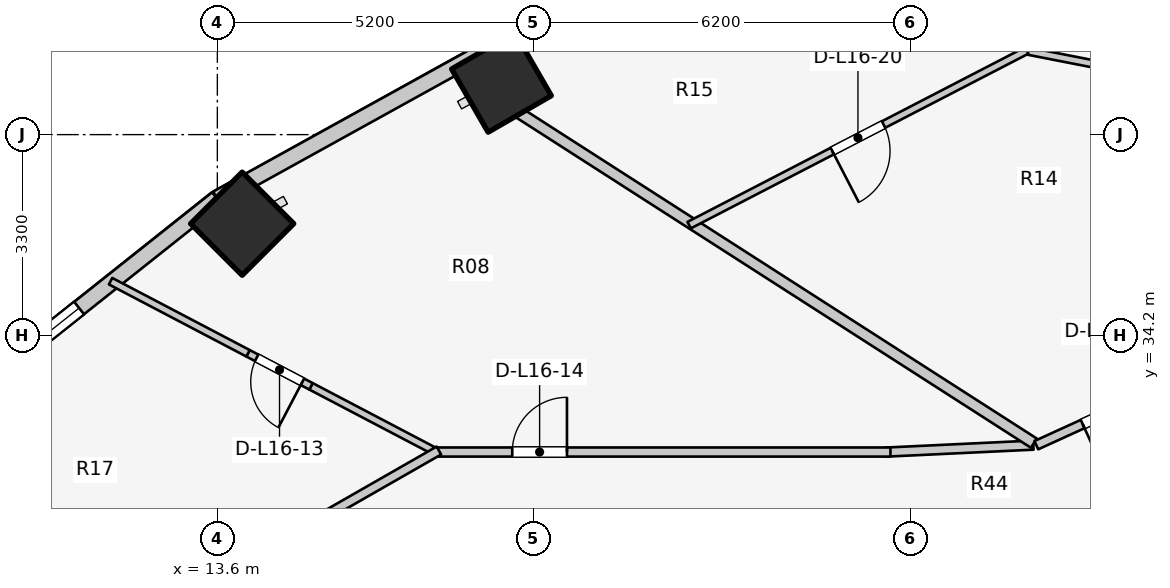
"""IFC4 building model, lengths in metres.
Left out: names, types, materials, properties, quantities, classifications, styles, units other than length and angle.
Written with IfcOpenShell. Run it as: python <this file> out.ifc"""

import sys

from ifc_helpers import new_model, si_unit, direction, frame, frame_2d, origin, origin_2d, place, context, subcontext, project, spatial, rectangle, extrude, element, fill, save


model = new_model("IFC4")
c1 = context("Model", 3, precision=1e-05, world=origin(), true_north=direction((0.0, 1.0)))
c2 = subcontext(c1, "Body", "Model", "MODEL_VIEW")
j1 = project(units=[si_unit("LENGTHUNIT", "METRE"), si_unit("PLANEANGLEUNIT", "RADIAN")], contexts=[c1])
p1 = place(None, origin())
s1 = spatial("IfcSite", under=j1, at=p1, CompositionType="ELEMENT")
p2 = place(p1, origin())
s2 = spatial("IfcBuilding", under=s1, at=p2, CompositionType="ELEMENT")
p3 = place(p2, frame((0.0, 0.0, 55.5)))
s3 = spatial("IfcBuildingStorey", under=s2, at=p3, CompositionType="ELEMENT", Elevation=55.5)
for number, where, z_axis, x_axis in (
    (1, (18.273, 38.359, 0.0), (0.0, 0.0, 1.0), (-0.5, 0.866, 0.0)),
    (2, (14.008, 36.035, 0.0), (0.0, 0.0, 1.0), (-0.707, 0.707, 0.0)),
):
    element("IfcColumn", number, at=place(p3, frame(where, z_axis=z_axis, x_axis=x_axis)), inside=s3, PredefinedType="COLUMN", context=c2, shape_type="SweptSolid", body=[
        extrude(rectangle(XDim=1.2, YDim=1.2, at=origin_2d()), origin(), (0.0, 0.0, 1.0), 3.1),
    ])
p4 = place(p3, frame((23.668, 40.553, 0.0), z_axis=(0.0, 0.0, 1.0), x_axis=(-0.958843593522, -0.283934786811, 0.0)))
e3 = element("IfcWall", 3, at=p4, inside=s3, PredefinedType="STANDARD", context=c2, shape_type="SweptSolid", body=[
    extrude(rectangle(XDim=5.955, YDim=0.26, at=frame_2d((2.978, 0.0))), origin(), (0.0, 0.0, 1.0), 2.85),
])
p5 = place(p4, frame((2.228, 0.0, 0.75)))
e4 = element("IfcOpeningElement", 4, at=p5, cuts=e3, PredefinedType="OPENING", context=c2, shape_type="SweptSolid", body=[
    extrude(rectangle(XDim=1.5, YDim=1.6, at=frame_2d((0.75, 0.8))), frame((0.0, 0.14, 0.0), z_axis=(0.0, -1.0, 0.0), x_axis=(1.0, 0.0, 0.0)), (0.0, 0.0, 1.0), 0.28),
])
p6 = place(p3, frame((17.958, 38.862, 0.0), z_axis=(0.0, 0.0, 1.0), x_axis=(-0.875137303239, -0.483874674352, 0.0)))
e5 = element("IfcWall", 5, at=p6, inside=s3, PredefinedType="STANDARD", context=c2, shape_type="SweptSolid", body=[
    extrude(rectangle(XDim=4.985, YDim=0.26, at=frame_2d((2.493, 0.0))), origin(), (0.0, 0.0, 1.0), 2.85),
])
p7 = place(p3, frame((13.595, 36.45, 0.0), z_axis=(0.0, 0.0, 1.0), x_axis=(-0.783123133379, -0.621866672179, 0.0)))
e6 = element("IfcWall", 6, at=p7, inside=s3, PredefinedType="STANDARD", context=c2, shape_type="SweptSolid", body=[
    extrude(rectangle(XDim=4.839, YDim=0.26, at=frame_2d((2.419, 0.0))), origin(), (0.0, 0.0, 1.0), 2.85),
])
p8 = place(p7, frame((2.898, 0.0, 0.75)))
e7 = element("IfcOpeningElement", 7, at=p8, cuts=e6, PredefinedType="OPENING", context=c2, shape_type="SweptSolid", body=[
    extrude(rectangle(XDim=1.2, YDim=1.5, at=frame_2d((0.6, 0.75))), frame((0.0, 0.14, 0.0), z_axis=(0.0, -1.0, 0.0), x_axis=(1.0, 0.0, 0.0)), (0.0, 0.0, 1.0), 0.28),
])
p9 = place(p3, frame((29.873, 31.906, 0.0), z_axis=(0.0, 0.0, 1.0), x_axis=(-0.906943449489, -0.421252393975, 0.0)))
e8 = element("IfcWall", 8, at=p9, inside=s3, PredefinedType="PARTITIONING", context=c2, shape_type="SweptSolid", body=[
    extrude(rectangle(XDim=2.186, YDim=0.15, at=frame_2d((1.093, 0.0))), origin(), (0.0, 0.0, 1.0), 2.237),
])
p10 = place(p3, frame((17.244, 32.257, 0.0), z_axis=(0.0, 0.0, 1.0), x_axis=(-0.885586030676, 0.464475383924, 0.0)))
e9 = element("IfcWall", 9, at=p10, inside=s3, PredefinedType="MOVABLE", context=c2, shape_type="SweptSolid", body=[
    extrude(rectangle(XDim=2.376, YDim=0.12, at=frame_2d((1.188, 0.0))), origin(), (0.0, 0.0, 1.0), 2.855),
])
p11 = place(p3, frame((15.14, 33.36, 0.0), z_axis=(0.0, 0.0, 1.0), x_axis=(-0.885447282698, 0.464739829972, 0.0)))
e10 = element("IfcWall", 10, at=p11, inside=s3, PredefinedType="MOVABLE", context=c2, shape_type="SweptSolid", body=[
    extrude(rectangle(XDim=1.17, YDim=0.12, at=frame_2d((0.585, 0.0))), origin(), (0.0, 0.0, 1.0), 2.11),
])
p12 = place(p11, frame((0.16, 0.0, 0.0)))
e11 = element("IfcOpeningElement", 11, at=p12, cuts=e10, PredefinedType="OPENING", context=c2, shape_type="SweptSolid", body=[
    extrude(rectangle(XDim=0.85, YDim=2.05, at=frame_2d((0.425, 1.025))), frame((0.0, 0.07, 0.0), z_axis=(0.0, -1.0, 0.0), x_axis=(1.0, 0.0, 0.0)), (0.0, 0.0, 1.0), 0.14),
])
p13 = place(p3, frame((14.104, 33.904, 0.0), z_axis=(0.0, 0.0, 1.0), x_axis=(-0.885573027611, 0.464500175208, 0.0)))
e12 = element("IfcWall", 12, at=p13, inside=s3, PredefinedType="MOVABLE", context=c2, shape_type="SweptSolid", body=[
    extrude(rectangle(XDim=2.552, YDim=0.12, at=frame_2d((1.276, 0.0))), origin(), (0.0, 0.0, 1.0), 2.855),
])
p14 = place(p3, frame((27.02, 32.394, 0.0), z_axis=(0.0, 0.0, 1.0), x_axis=(-0.998877427952, -0.047369651964, 0.0)))
e13 = element("IfcWall", 13, at=p14, inside=s3, PredefinedType="PARTITIONING", context=c2, shape_type="SweptSolid", body=[
    extrude(rectangle(XDim=2.433, YDim=0.15, at=frame_2d((1.216, 0.0))), origin(), (0.0, 0.0, 1.0), 2.237),
])
p15 = place(p3, frame((17.15, 32.28, 0.0), z_axis=(0.0, 0.0, 1.0), x_axis=(1.0, 0.0, 0.0)))
e14 = element("IfcWall", 14, at=p15, inside=s3, PredefinedType="PARTITIONING", context=c2, shape_type="SweptSolid", body=[
    extrude(rectangle(XDim=7.52, YDim=0.15, at=frame_2d((3.76, 0.0))), origin(), (0.0, 0.0, 1.0), 2.237),
])
p16 = place(p15, frame((1.3, 0.0, 0.0)))
e15 = element("IfcOpeningElement", 15, at=p16, cuts=e14, PredefinedType="OPENING", context=c2, shape_type="SweptSolid", body=[
    extrude(rectangle(XDim=0.9, YDim=2.1, at=frame_2d((0.45, 1.05))), frame((0.0, 0.085, 0.0), z_axis=(0.0, -1.0, 0.0), x_axis=(1.0, 0.0, 0.0)), (0.0, 0.0, 1.0), 0.17),
])
p17 = place(p3, frame((17.243, 32.305, 0.0), z_axis=(0.0, 0.0, 1.0), x_axis=(-0.867991349648, -0.496579315857, 0.0)))
e16 = element("IfcWall", 16, at=p17, inside=s3, PredefinedType="PARTITIONING", context=c2, shape_type="SweptSolid", body=[
    extrude(rectangle(XDim=2.567, YDim=0.15, at=frame_2d((1.283, 0.0))), origin(), (0.0, 0.0, 1.0), 2.069),
])
p18 = place(p3, frame((27.029, 32.426, 0.0), z_axis=(0.0, 0.0, 1.0), x_axis=(-0.841689919529, 0.5399611832, 0.0)))
e17 = element("IfcWall", 17, at=p18, inside=s3, PredefinedType="PARTITIONING", context=c2, shape_type="SweptSolid", body=[
    extrude(rectangle(XDim=10.058, YDim=0.18, at=frame_2d((5.029, 0.0))), origin(), (0.0, 0.0, 1.0), 2.237),
])
p19 = place(p3, frame((32.049, 37.871, 0.0), z_axis=(0.0, 0.0, 1.0), x_axis=(-0.981343325718, 0.192263561471, 0.0)))
e18 = element("IfcWall", 18, at=p19, inside=s3, PredefinedType="MOVABLE", context=c2, shape_type="SweptSolid", body=[
    extrude(rectangle(XDim=5.255, YDim=0.12, at=frame_2d((2.627, 0.0))), origin(), (0.0, 0.0, 1.0), 2.237),
])
p20 = place(p3, frame((26.911, 38.884, 0.0), z_axis=(0.0, 0.0, 1.0), x_axis=(-0.88815498257, -0.459544042433, 0.0)))
e19 = element("IfcWall", 19, at=p20, inside=s3, PredefinedType="MOVABLE", context=c2, shape_type="SweptSolid", body=[
    extrude(rectangle(XDim=6.251, YDim=0.12, at=frame_2d((3.125, 0.0))), origin(), (0.0, 0.0, 1.0), 2.237),
])
p21 = place(p20, frame((2.65, 0.0, 0.0)))
e20 = element("IfcOpeningElement", 20, at=p21, cuts=e19, PredefinedType="OPENING", context=c2, shape_type="SweptSolid", body=[
    extrude(rectangle(XDim=0.95, YDim=2.1, at=frame_2d((0.475, 1.05))), frame((0.0, 0.07, 0.0), z_axis=(0.0, -1.0, 0.0), x_axis=(1.0, 0.0, 0.0)), (0.0, 0.0, 1.0), 0.14),
])
p22 = place(p3, frame((29.457, 33.482, 0.0), z_axis=(0.0, 0.0, 1.0), x_axis=(-0.909747571199, -0.415161843982, 0.0)))
e21 = element("IfcWall", 21, at=p22, inside=s3, PredefinedType="PARTITIONING", context=c2, shape_type="SweptSolid", body=[
    extrude(rectangle(XDim=2.625, YDim=0.15, at=frame_2d((1.312, 0.0))), origin(), (0.0, 0.0, 1.0), 2.237),
])
p23 = place(p22, frame((0.838, 0.0, 0.0)))
e22 = element("IfcOpeningElement", 22, at=p23, cuts=e21, PredefinedType="OPENING", context=c2, shape_type="SweptSolid", body=[
    extrude(rectangle(XDim=0.95, YDim=2.1, at=frame_2d((0.475, 1.05))), frame((0.0, 0.085, 0.0), z_axis=(0.0, -1.0, 0.0), x_axis=(1.0, 0.0, 0.0)), (0.0, 0.0, 1.0), 0.17),
])
p24 = place(p8, origin())
e23 = element("IfcWindow", 23, at=p24, inside=s3, PartitioningType="SINGLE_PANEL", PredefinedType="WINDOW", context=c2, shape_type="SweptSolid", body=[
    extrude(rectangle(XDim=1.2, YDim=1.5, at=frame_2d((0.6, 0.75))), frame((0.0, 0.03, 0.0), z_axis=(0.0, -1.0, 0.0), x_axis=(1.0, 0.0, 0.0)), (0.0, 0.0, 1.0), 0.06),
])
fill(e7, e23)
p25 = place(p12, origin())
e24 = element("IfcDoor", 24, at=p25, inside=s3, OperationType="SINGLE_SWING_LEFT", PredefinedType="DOOR", context=c2, shape_type="SweptSolid", body=[
    extrude(rectangle(XDim=0.85, YDim=2.05, at=frame_2d((0.425, 1.025))), frame((0.0, 0.025, 0.0), z_axis=(0.0, -1.0, 0.0), x_axis=(1.0, 0.0, 0.0)), (0.0, 0.0, 1.0), 0.05),
])
fill(e11, e24)
p26 = place(p16, origin())
e25 = element("IfcDoor", 25, at=p26, inside=s3, OperationType="SINGLE_SWING_RIGHT", PredefinedType="DOOR", context=c2, shape_type="SweptSolid", body=[
    extrude(rectangle(XDim=0.9, YDim=2.1, at=frame_2d((0.45, 1.05))), frame((0.0, 0.025, 0.0), z_axis=(0.0, -1.0, 0.0), x_axis=(1.0, 0.0, 0.0)), (0.0, 0.0, 1.0), 0.05),
])
fill(e15, e25)
p27 = place(p21, origin())
e26 = element("IfcDoor", 26, at=p27, inside=s3, OperationType="SINGLE_SWING_RIGHT", PredefinedType="DOOR", context=c2, shape_type="SweptSolid", body=[
    extrude(rectangle(XDim=0.95, YDim=2.1, at=frame_2d((0.475, 1.05))), frame((0.0, 0.025, 0.0), z_axis=(0.0, -1.0, 0.0), x_axis=(1.0, 0.0, 0.0)), (0.0, 0.0, 1.0), 0.05),
])
fill(e20, e26)
p28 = place(p23, origin())
e27 = element("IfcDoor", 27, at=p28, inside=s3, OperationType="SINGLE_SWING_RIGHT", PredefinedType="DOOR", context=c2, shape_type="SweptSolid", body=[
    extrude(rectangle(XDim=0.95, YDim=2.1, at=frame_2d((0.475, 1.05))), frame((0.0, 0.025, 0.0), z_axis=(0.0, -1.0, 0.0), x_axis=(1.0, 0.0, 0.0)), (0.0, 0.0, 1.0), 0.05),
])
fill(e22, e27)
save(model, sys.argv[1])
